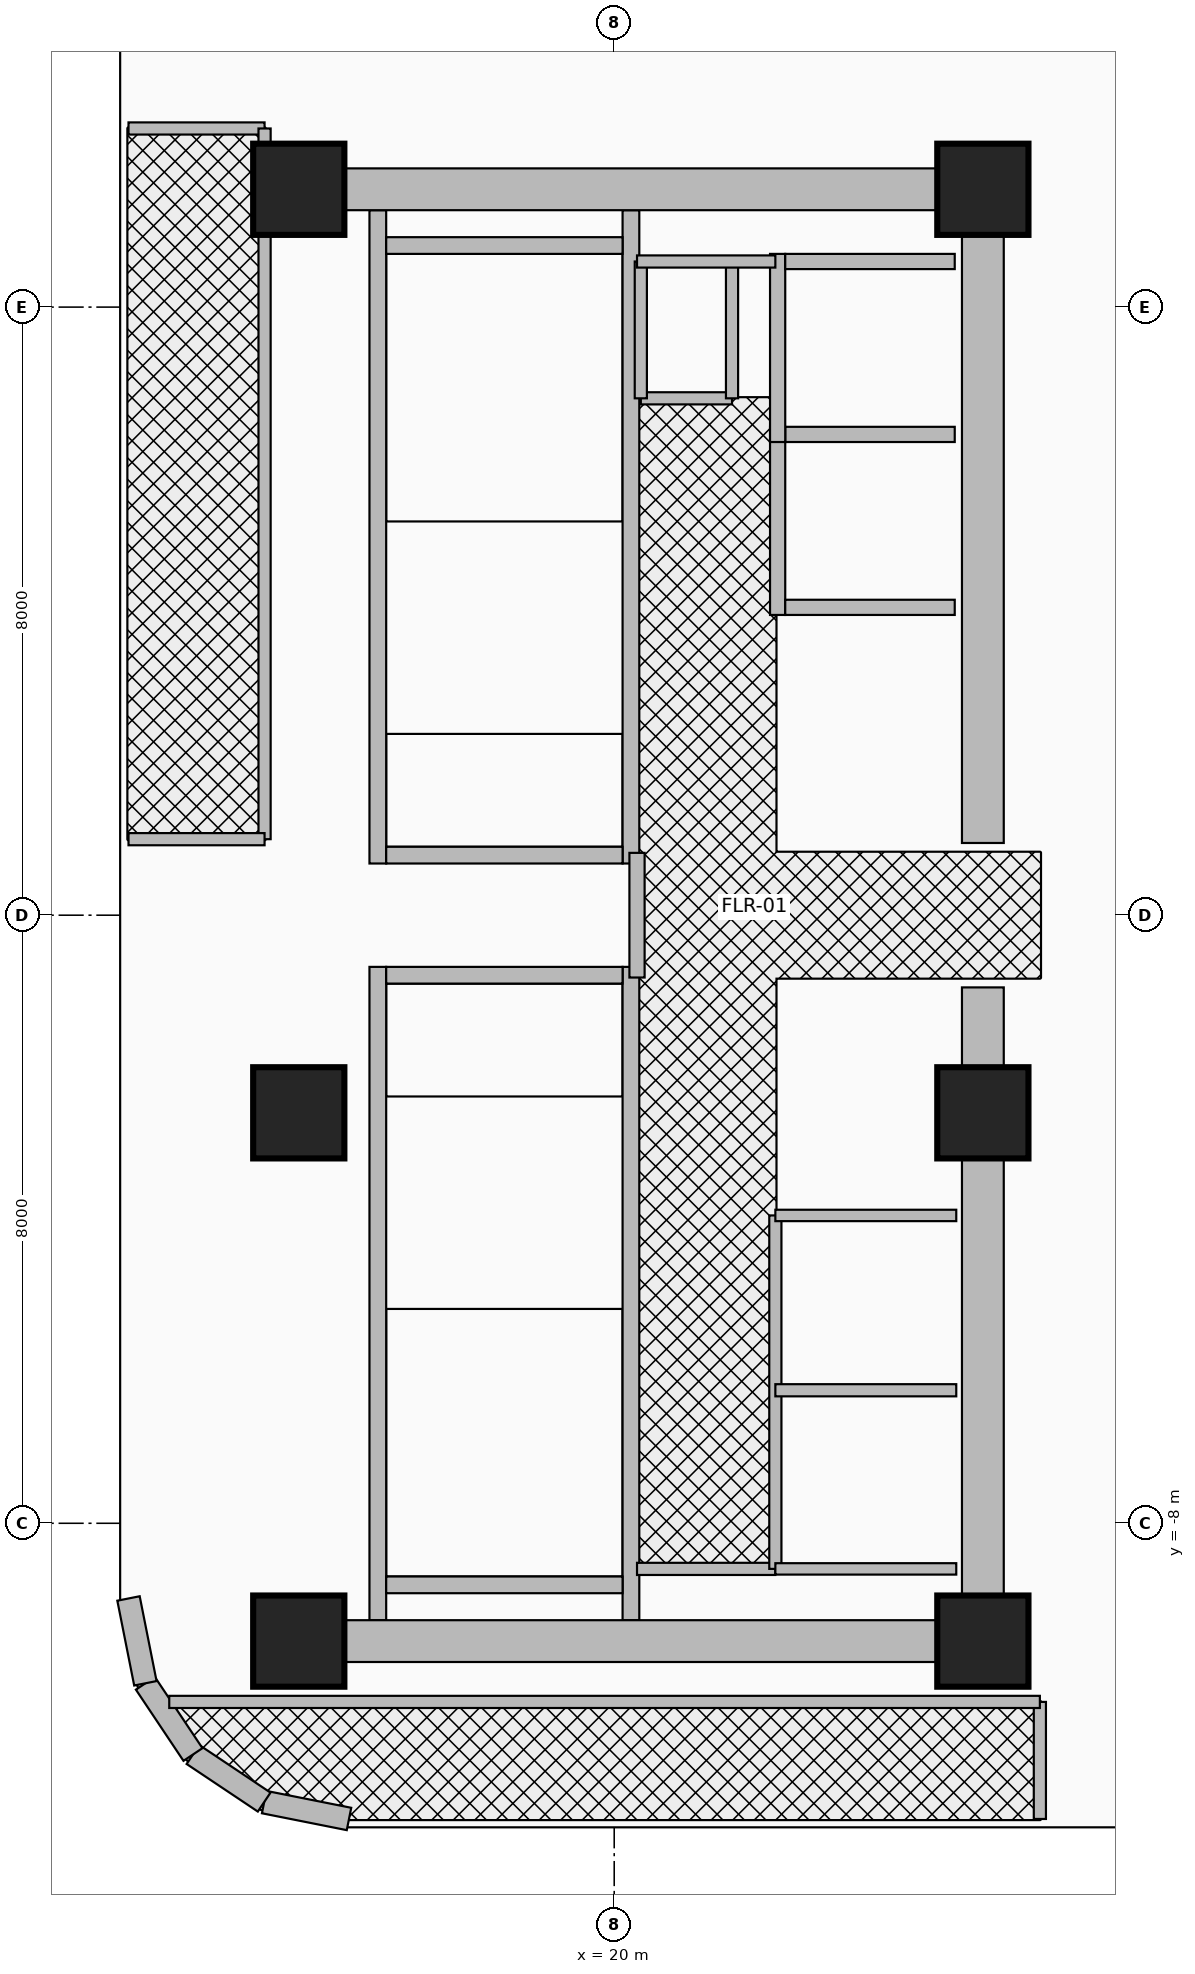
"""IFC4 building model, lengths in metres.
Left out: names, types, materials, properties, quantities, classifications, styles, units other than length and angle.
Written with IfcOpenShell. Run it as: python <this file> out.ifc"""

import sys

from ifc_helpers import new_model, si_unit, direction, frame, frame_2d, origin, origin_2d, place, context, subcontext, project, spatial, rectangle, extrude, source, transform, mapped, element, fill, save


model = new_model("IFC4")
c1 = context("Model", 3, precision=1e-05, world=origin(), true_north=direction((0.0, 1.0)))
c2 = subcontext(c1, "Body", "Model", "MODEL_VIEW")
j1 = project(units=[si_unit("LENGTHUNIT", "METRE"), si_unit("PLANEANGLEUNIT", "RADIAN")], contexts=[c1])
p1 = place(None, origin())
s1 = spatial("IfcSite", under=j1, at=p1, CompositionType="ELEMENT")
p2 = place(p1, origin())
s2 = spatial("IfcBuilding", under=s1, at=p2, CompositionType="ELEMENT")
p3 = place(p2, frame((0.0, 0.0, 153.8)))
s3 = spatial("IfcBuildingStorey", under=s2, at=p3, CompositionType="ELEMENT", Elevation=153.8)
for number, where, z_axis, x_axis in (
    (1, (16.89, 0.68, 0.0), (0.0, 0.0, 1.0), (0.0, 1.0, 0.0)),
    (2, (20.22, 0.68, 0.0), (0.0, 0.0, 1.0), (0.0, 1.0, 0.0)),
):
    element("IfcWall", number, at=place(p3, frame(where, z_axis=z_axis, x_axis=x_axis)), inside=s3, PredefinedType="SHEAR", context=c2, shape_type="SweptSolid", body=[
        extrude(rectangle(XDim=8.595, YDim=0.22, at=frame_2d((4.297, 0.0))), origin(), (0.0, 0.0, 1.0), 3.46),
    ])
p4 = place(p3, frame((17.0, 0.79, 0.0), z_axis=(0.0, 0.0, 1.0), x_axis=(1.0, 0.0, 0.0)))
e3 = element("IfcWall", 3, at=p4, inside=s3, PredefinedType="SHEAR", context=c2, shape_type="SweptSolid", body=[
    extrude(rectangle(XDim=3.11, YDim=0.22, at=frame_2d((1.555, 0.0))), origin(), (0.0, 0.0, 1.0), 3.46),
])
p5 = place(p4, frame((0.95, 0.0, 0.0)))
e4 = element("IfcOpeningElement", 4, at=p5, cuts=e3, PredefinedType="OPENING", context=c2, shape_type="SweptSolid", body=[
    extrude(rectangle(XDim=1.1, YDim=2.15, at=frame_2d((0.55, 1.075))), frame((0.0, 0.125, 0.0), z_axis=(0.0, -1.0, 0.0), x_axis=(1.0, 0.0, 0.0)), (0.0, 0.0, 1.0), 0.25),
])
p6 = place(p3, frame((17.0, 8.81, 0.0), z_axis=(0.0, 0.0, 1.0), x_axis=(1.0, 0.0, 0.0)))
e5 = element("IfcWall", 5, at=p6, inside=s3, PredefinedType="SHEAR", context=c2, shape_type="SweptSolid", body=[
    extrude(rectangle(XDim=3.11, YDim=0.22, at=frame_2d((1.555, 0.0))), origin(), (0.0, 0.0, 1.0), 3.46),
])
for number, where, z_axis, x_axis in (
    (6, (16.89, -9.275, 0.0), (0.0, 0.0, 1.0), (0.0, 1.0, 0.0)),
    (7, (20.22, -9.275, 0.0), (0.0, 0.0, 1.0), (0.0, 1.0, 0.0)),
):
    element("IfcWall", number, at=place(p3, frame(where, z_axis=z_axis, x_axis=x_axis)), inside=s3, PredefinedType="SHEAR", context=c2, shape_type="SweptSolid", body=[
        extrude(rectangle(XDim=8.595, YDim=0.22, at=frame_2d((4.297, 0.0))), origin(), (0.0, 0.0, 1.0), 3.46),
    ])
p7 = place(p3, frame((17.0, -8.81, 0.0), z_axis=(0.0, 0.0, 1.0), x_axis=(1.0, 0.0, 0.0)))
e8 = element("IfcWall", 8, at=p7, inside=s3, PredefinedType="SHEAR", context=c2, shape_type="SweptSolid", body=[
    extrude(rectangle(XDim=3.11, YDim=0.22, at=frame_2d((1.555, 0.0))), origin(), (0.0, 0.0, 1.0), 3.46),
])
p8 = place(p3, frame((17.0, -0.79, 0.0), z_axis=(0.0, 0.0, 1.0), x_axis=(1.0, 0.0, 0.0)))
e9 = element("IfcWall", 9, at=p8, inside=s3, PredefinedType="SHEAR", context=c2, shape_type="SweptSolid", body=[
    extrude(rectangle(XDim=3.11, YDim=0.22, at=frame_2d((1.555, 0.0))), origin(), (0.0, 0.0, 1.0), 3.46),
])
p9 = place(p8, frame((0.95, 0.0, 0.0)))
e10 = element("IfcOpeningElement", 10, at=p9, cuts=e9, PredefinedType="OPENING", context=c2, shape_type="SweptSolid", body=[
    extrude(rectangle(XDim=1.1, YDim=2.15, at=frame_2d((0.55, 1.075))), frame((0.0, 0.125, 0.0), z_axis=(0.0, -1.0, 0.0), x_axis=(1.0, 0.0, 0.0)), (0.0, 0.0, 1.0), 0.25),
])
for number, where, z_axis, x_axis in (
    (11, (24.85, -9.825, 0.0), (0.0, 0.0, 1.0), (0.0, 1.0, 0.0)),
    (12, (24.85, 0.95, 0.0), (0.0, 0.0, 1.0), (0.0, 1.0, 0.0)),
):
    element("IfcWall", number, at=place(p3, frame(where, z_axis=z_axis, x_axis=x_axis)), inside=s3, PredefinedType="SHEAR", context=c2, shape_type="SweptSolid", body=[
        extrude(rectangle(XDim=8.875, YDim=0.55, at=frame_2d((4.438, 0.0))), origin(), (0.0, 0.0, 1.0), 3.46),
    ])
for number, where, z_axis, x_axis in (
    (13, (15.85, 9.55, 0.0), (0.0, 0.0, 1.0), (1.0, 0.0, 0.0)),
    (14, (15.85, -9.55, 0.0), (0.0, 0.0, 1.0), (1.0, 0.0, 0.0)),
):
    element("IfcWall", number, at=place(p3, frame(where, z_axis=z_axis, x_axis=x_axis)), inside=s3, PredefinedType="SHEAR", context=c2, shape_type="SweptSolid", body=[
        extrude(rectangle(XDim=9.0, YDim=0.55, at=frame_2d((4.5, 0.0))), origin(), (0.0, 0.0, 1.0), 3.46),
    ])
m1 = source(origin(), c2, "Body", "SweptSolid", [
    extrude(rectangle(XDim=1.2, YDim=1.2, at=origin_2d()), origin(), (0.0, 0.0, 1.0), 3.7),
])
for number, where, z_axis, x_axis in (
    (15, (15.85, -9.55, 0.0), (0.0, 0.0, 1.0), (1.0, 0.0, 0.0)),
    (16, (24.85, -9.55, 0.0), (0.0, 0.0, 1.0), (1.0, 0.0, 0.0)),
    (17, (15.85, -2.6, 0.0), (0.0, 0.0, 1.0), (1.0, 0.0, 0.0)),
    (18, (24.85, -2.6, 0.0), (0.0, 0.0, 1.0), (1.0, 0.0, 0.0)),
    (19, (15.85, 9.55, 0.0), (0.0, 0.0, 1.0), (1.0, 0.0, 0.0)),
    (20, (24.85, 9.55, 0.0), (0.0, 0.0, 1.0), (1.0, 0.0, 0.0)),
):
    element("IfcColumn", number, at=place(p3, frame(where, z_axis=z_axis, x_axis=x_axis)), inside=s3, PredefinedType="COLUMN", context=c2, shape_type="MappedRepresentation", body=[
        mapped(m1, transform((0.0, 0.0, 0.0), x_axis=(1.0, 0.0, 0.0), y_axis=(0.0, 1.0, 0.0), z_axis=(0.0, 0.0, 1.0), scale=1.0)),
    ])
p10 = place(p3, frame((16.511, -11.89, 0.0), z_axis=(0.0, 0.0, 1.0), x_axis=(-0.980794657743, 0.195043173023, 0.0)))
e21 = element("IfcWall", 21, at=p10, inside=s3, PredefinedType="SOLIDWALL", context=c2, shape_type="SweptSolid", body=[
    extrude(rectangle(XDim=1.138, YDim=0.3, at=frame_2d((0.569, 0.0))), origin(), (0.0, 0.0, 1.0), 3.46),
])
for number, where, z_axis, x_axis in (
    (22, (15.395, -11.668, 0.0), (0.0, 0.0, 1.0), (-0.831, 0.556, 0.0)),
    (23, (14.458, -11.042, 0.0), (0.0, 0.0, 1.0), (-0.556, 0.831, 0.0)),
):
    element("IfcWall", number, at=place(p3, frame(where, z_axis=z_axis, x_axis=x_axis)), inside=s3, PredefinedType="SOLIDWALL", context=c2, shape_type="SweptSolid", body=[
        extrude(rectangle(XDim=1.127, YDim=0.3, at=frame_2d((0.563, 0.0))), origin(), (0.0, 0.0, 1.0), 3.46),
    ])
p11 = place(p3, frame((13.832, -10.105, 0.0), z_axis=(0.0, 0.0, 1.0), x_axis=(-0.195043173023, 0.980794657743, 0.0)))
e24 = element("IfcWall", 24, at=p11, inside=s3, PredefinedType="SOLIDWALL", context=c2, shape_type="SweptSolid", body=[
    extrude(rectangle(XDim=1.138, YDim=0.3, at=frame_2d((0.569, 0.0))), origin(), (0.0, 0.0, 1.0), 3.46),
])
p12 = place(p3, frame((22.15, 3.95, 0.0), z_axis=(0.0, 0.0, 1.0), x_axis=(0.0, 1.0, 0.0)))
e25 = element("IfcWall", 25, at=p12, inside=s3, PredefinedType="MOVABLE", context=c2, shape_type="SweptSolid", body=[
    extrude(rectangle(XDim=2.475, YDim=0.2, at=frame_2d((1.238, 0.0))), origin(), (0.0, 0.0, 1.0), 3.46),
])
p13 = place(p12, frame((0.688, 0.0, 0.0)))
e26 = element("IfcOpeningElement", 26, at=p13, cuts=e25, PredefinedType="OPENING", context=c2, shape_type="SweptSolid", body=[
    extrude(rectangle(XDim=1.1, YDim=2.1, at=frame_2d((0.55, 1.05))), frame((0.0, 0.115, 0.0), z_axis=(0.0, -1.0, 0.0), x_axis=(1.0, 0.0, 0.0)), (0.0, 0.0, 1.0), 0.23),
])
for number, where, z_axis, x_axis in (
    (27, (22.25, 4.05, 0.0), (0.0, 0.0, 1.0), (1.0, 0.0, 0.0)),
    (28, (22.25, 6.325, 0.0), (0.0, 0.0, 1.0), (1.0, 0.0, 0.0)),
):
    element("IfcWall", number, at=place(p3, frame(where, z_axis=z_axis, x_axis=x_axis)), inside=s3, PredefinedType="MOVABLE", context=c2, shape_type="SweptSolid", body=[
        extrude(rectangle(XDim=2.23, YDim=0.2, at=frame_2d((1.115, 0.0))), origin(), (0.0, 0.0, 1.0), 3.46),
    ])
p14 = place(p3, frame((22.15, 6.225, 0.0), z_axis=(0.0, 0.0, 1.0), x_axis=(0.0, 1.0, 0.0)))
e29 = element("IfcWall", 29, at=p14, inside=s3, PredefinedType="MOVABLE", context=c2, shape_type="SweptSolid", body=[
    extrude(rectangle(XDim=2.475, YDim=0.2, at=frame_2d((1.237, 0.0))), origin(), (0.0, 0.0, 1.0), 3.46),
])
p15 = place(p14, frame((0.688, 0.0, 0.0)))
e30 = element("IfcOpeningElement", 30, at=p15, cuts=e29, PredefinedType="OPENING", context=c2, shape_type="SweptSolid", body=[
    extrude(rectangle(XDim=1.1, YDim=2.1, at=frame_2d((0.55, 1.05))), frame((0.0, 0.115, 0.0), z_axis=(0.0, -1.0, 0.0), x_axis=(1.0, 0.0, 0.0)), (0.0, 0.0, 1.0), 0.23),
])
p16 = place(p3, frame((22.25, 8.6, 0.0), z_axis=(0.0, 0.0, 1.0), x_axis=(1.0, 0.0, 0.0)))
e31 = element("IfcWall", 31, at=p16, inside=s3, PredefinedType="MOVABLE", context=c2, shape_type="SweptSolid", body=[
    extrude(rectangle(XDim=2.23, YDim=0.2, at=frame_2d((1.115, 0.0))), origin(), (0.0, 0.0, 1.0), 3.46),
])
p17 = place(p3, frame((20.3, -0.82, 0.0), z_axis=(0.0, 0.0, 1.0), x_axis=(0.0, 1.0, 0.0)))
e32 = element("IfcWall", 32, at=p17, inside=s3, PredefinedType="PARTITIONING", context=c2, shape_type="SweptSolid", body=[
    extrude(rectangle(XDim=1.64, YDim=0.2, at=frame_2d((0.82, 0.0))), origin(), (0.0, 0.0, 1.0), 3.46),
])
p18 = place(p17, frame((0.295, 0.0, 0.0)))
e33 = element("IfcOpeningElement", 33, at=p18, cuts=e32, PredefinedType="OPENING", context=c2, shape_type="SweptSolid", body=[
    extrude(rectangle(XDim=1.05, YDim=2.15, at=frame_2d((0.525, 1.075))), frame((0.0, 0.115, 0.0), z_axis=(0.0, -1.0, 0.0), x_axis=(1.0, 0.0, 0.0)), (0.0, 0.0, 1.0), 0.23),
])
p19 = place(p3, frame((20.35, 6.8, 0.0), z_axis=(0.0, 0.0, 1.0), x_axis=(1.0, 0.0, 0.0)))
e34 = element("IfcWall", 34, at=p19, inside=s3, PredefinedType="PARTITIONING", context=c2, shape_type="SweptSolid", body=[
    extrude(rectangle(XDim=1.2, YDim=0.16, at=frame_2d((0.6, 0.0))), origin(), (0.0, 0.0, 1.0), 3.46),
])
p20 = place(p19, frame((0.175, 0.0, 0.0)))
e35 = element("IfcOpeningElement", 35, at=p20, cuts=e34, PredefinedType="OPENING", context=c2, shape_type="SweptSolid", body=[
    extrude(rectangle(XDim=0.85, YDim=2.05, at=frame_2d((0.425, 1.025))), frame((0.0, 0.095, 0.0), z_axis=(0.0, -1.0, 0.0), x_axis=(1.0, 0.0, 0.0)), (0.0, 0.0, 1.0), 0.19),
])
for number, where, z_axis, x_axis in (
    (36, (21.55, 6.8, 0.0), (0.0, 0.0, 1.0), (0.0, 1.0, 0.0)),
    (37, (20.35, 6.8, 0.0), (0.0, 0.0, 1.0), (0.0, 1.0, 0.0)),
):
    element("IfcWall", number, at=place(p3, frame(where, z_axis=z_axis, x_axis=x_axis)), inside=s3, PredefinedType="PARTITIONING", context=c2, shape_type="SweptSolid", body=[
        extrude(rectangle(XDim=1.8, YDim=0.16, at=frame_2d((0.9, 0.0))), origin(), (0.0, 0.0, 1.0), 3.46),
    ])
for number, where, z_axis, x_axis in (
    (38, (20.3, -8.6, 0.0), (0.0, 0.0, 1.0), (1.0, 0.0, 0.0)),
    (39, (20.3, 8.6, 0.0), (0.0, 0.0, 1.0), (1.0, 0.0, 0.0)),
):
    element("IfcWall", number, at=place(p3, frame(where, z_axis=z_axis, x_axis=x_axis)), inside=s3, PredefinedType="PARTITIONING", context=c2, shape_type="SweptSolid", body=[
        extrude(rectangle(XDim=1.82, YDim=0.16, at=frame_2d((0.91, 0.0))), origin(), (0.0, 0.0, 1.0), 3.46),
    ])
p21 = place(p3, frame((22.12, -8.6, 0.0), z_axis=(0.0, 0.0, 1.0), x_axis=(0.0, 1.0, 0.0)))
e40 = element("IfcWall", 40, at=p21, inside=s3, PredefinedType="PARTITIONING", context=c2, shape_type="SweptSolid", body=[
    extrude(rectangle(XDim=4.65, YDim=0.16, at=frame_2d((2.325, 0.0))), origin(), (0.0, 0.0, 1.0), 3.46),
])
p22 = place(p21, frame((0.7, 0.0, 0.0)))
e41 = element("IfcOpeningElement", 41, at=p22, cuts=e40, PredefinedType="OPENING", context=c2, shape_type="SweptSolid", body=[
    extrude(rectangle(XDim=0.85, YDim=2.05, at=frame_2d((0.425, 1.025))), frame((0.0, 0.095, 0.0), z_axis=(0.0, -1.0, 0.0), x_axis=(1.0, 0.0, 0.0)), (0.0, 0.0, 1.0), 0.19),
])
p23 = place(p21, frame((3.0, 0.0, 0.0)))
e42 = element("IfcOpeningElement", 42, at=p23, cuts=e40, PredefinedType="OPENING", context=c2, shape_type="SweptSolid", body=[
    extrude(rectangle(XDim=0.85, YDim=2.05, at=frame_2d((0.425, 1.025))), frame((0.0, 0.095, 0.0), z_axis=(0.0, -1.0, 0.0), x_axis=(1.0, 0.0, 0.0)), (0.0, 0.0, 1.0), 0.19),
])
for number, where, z_axis, x_axis in (
    (43, (22.12, -3.95, 0.0), (0.0, 0.0, 1.0), (1.0, 0.0, 0.0)),
    (44, (22.12, -8.6, 0.0), (0.0, 0.0, 1.0), (1.0, 0.0, 0.0)),
):
    element("IfcWall", number, at=place(p3, frame(where, z_axis=z_axis, x_axis=x_axis)), inside=s3, PredefinedType="PARTITIONING", context=c2, shape_type="SweptSolid", body=[
        extrude(rectangle(XDim=2.38, YDim=0.15, at=frame_2d((1.19, 0.0))), origin(), (0.0, 0.0, 1.0), 3.46),
    ])
p24 = place(p3, frame((22.12, -6.25, 0.0), z_axis=(0.0, 0.0, 1.0), x_axis=(1.0, 0.0, 0.0)))
e45 = element("IfcWall", 45, at=p24, inside=s3, PredefinedType="PARTITIONING", context=c2, shape_type="SweptSolid", body=[
    extrude(rectangle(XDim=2.38, YDim=0.16, at=frame_2d((1.19, 0.0))), origin(), (0.0, 0.0, 1.0), 3.46),
])
p25 = place(p3, frame((25.6, -11.89, 0.0), z_axis=(0.0, 0.0, 1.0), x_axis=(0.0, 1.0, 0.0)))
e46 = element("IfcWall", 46, at=p25, inside=s3, PredefinedType="PARTITIONING", context=c2, shape_type="SweptSolid", body=[
    extrude(rectangle(XDim=1.54, YDim=0.16, at=frame_2d((0.77, 0.0))), origin(), (0.0, 0.0, 1.0), 3.46),
])
p26 = place(p25, frame((0.32, 0.0, 0.0)))
e47 = element("IfcOpeningElement", 47, at=p26, cuts=e46, PredefinedType="OPENING", context=c2, shape_type="SweptSolid", body=[
    extrude(rectangle(XDim=0.9, YDim=2.1, at=frame_2d((0.45, 1.05))), frame((0.0, 0.095, 0.0), z_axis=(0.0, -1.0, 0.0), x_axis=(1.0, 0.0, 0.0)), (0.0, 0.0, 1.0), 0.19),
])
p27 = place(p3, frame((14.146, -10.35, 0.0), z_axis=(0.0, 0.0, 1.0), x_axis=(1.0, 0.0, 0.0)))
e48 = element("IfcWall", 48, at=p27, inside=s3, PredefinedType="PARTITIONING", context=c2, shape_type="SweptSolid", body=[
    extrude(rectangle(XDim=11.454, YDim=0.16, at=frame_2d((5.727, 0.0))), origin(), (0.0, 0.0, 1.0), 3.46),
])
p28 = place(p3, frame((13.61, 10.35, 0.0), z_axis=(0.0, 0.0, 1.0), x_axis=(1.0, 0.0, 0.0)))
e49 = element("IfcWall", 49, at=p28, inside=s3, PredefinedType="PARTITIONING", context=c2, shape_type="SweptSolid", body=[
    extrude(rectangle(XDim=1.79, YDim=0.16, at=frame_2d((0.895, 0.0))), origin(), (0.0, 0.0, 1.0), 3.46),
])
p29 = place(p28, frame((0.45, 0.0, 0.0)))
e50 = element("IfcOpeningElement", 50, at=p29, cuts=e49, PredefinedType="OPENING", context=c2, shape_type="SweptSolid", body=[
    extrude(rectangle(XDim=0.9, YDim=2.1, at=frame_2d((0.45, 1.05))), frame((0.0, 0.095, 0.0), z_axis=(0.0, -1.0, 0.0), x_axis=(1.0, 0.0, 0.0)), (0.0, 0.0, 1.0), 0.19),
])
p30 = place(p3, frame((15.4, 1.0, 0.0), z_axis=(0.0, 0.0, 1.0), x_axis=(0.0, 1.0, 0.0)))
e51 = element("IfcWall", 51, at=p30, inside=s3, PredefinedType="PARTITIONING", context=c2, shape_type="SweptSolid", body=[
    extrude(rectangle(XDim=9.35, YDim=0.16, at=frame_2d((4.675, 0.0))), origin(), (0.0, 0.0, 1.0), 3.46),
])
p31 = place(p3, frame((13.61, 1.0, 0.0), z_axis=(0.0, 0.0, 1.0), x_axis=(1.0, 0.0, 0.0)))
e52 = element("IfcWall", 52, at=p31, inside=s3, PredefinedType="PARTITIONING", context=c2, shape_type="SweptSolid", body=[
    extrude(rectangle(XDim=1.79, YDim=0.16, at=frame_2d((0.895, 0.0))), origin(), (0.0, 0.0, 1.0), 3.46),
])
p32 = place(p13, origin())
e53 = element("IfcDoor", 53, at=p32, inside=s3, OperationType="DOUBLE_DOOR_SLIDING", PredefinedType="DOOR", context=c2, shape_type="SweptSolid", body=[
    extrude(rectangle(XDim=1.1, YDim=2.1, at=frame_2d((0.55, 1.05))), frame((0.0, 0.025, 0.0), z_axis=(0.0, -1.0, 0.0), x_axis=(1.0, 0.0, 0.0)), (0.0, 0.0, 1.0), 0.05),
])
fill(e26, e53)
p33 = place(p15, origin())
e54 = element("IfcDoor", 54, at=p33, inside=s3, OperationType="DOUBLE_DOOR_SLIDING", PredefinedType="DOOR", context=c2, shape_type="SweptSolid", body=[
    extrude(rectangle(XDim=1.1, YDim=2.1, at=frame_2d((0.55, 1.05))), frame((0.0, 0.025, 0.0), z_axis=(0.0, -1.0, 0.0), x_axis=(1.0, 0.0, 0.0)), (0.0, 0.0, 1.0), 0.05),
])
fill(e30, e54)
p34 = place(p18, origin())
e55 = element("IfcDoor", 55, at=p34, inside=s3, OperationType="SINGLE_SWING_RIGHT", PredefinedType="DOOR", context=c2, shape_type="SweptSolid", body=[
    extrude(rectangle(XDim=1.05, YDim=2.15, at=frame_2d((0.525, 1.075))), frame((0.0, 0.025, 0.0), z_axis=(0.0, -1.0, 0.0), x_axis=(1.0, 0.0, 0.0)), (0.0, 0.0, 1.0), 0.05),
])
fill(e33, e55)
p35 = place(p5, frame((1.1, 0.0, 0.0), z_axis=(0.0, 0.0, 1.0), x_axis=(-1.0, 0.0, 0.0)))
e56 = element("IfcDoor", 56, at=p35, inside=s3, OperationType="SINGLE_SWING_LEFT", PredefinedType="DOOR", context=c2, shape_type="SweptSolid", body=[
    extrude(rectangle(XDim=1.1, YDim=2.15, at=frame_2d((0.55, 1.075))), frame((0.0, 0.025, 0.0), z_axis=(0.0, -1.0, 0.0), x_axis=(1.0, 0.0, 0.0)), (0.0, 0.0, 1.0), 0.05),
])
fill(e4, e56)
p36 = place(p9, origin())
e57 = element("IfcDoor", 57, at=p36, inside=s3, OperationType="SINGLE_SWING_RIGHT", PredefinedType="DOOR", context=c2, shape_type="SweptSolid", body=[
    extrude(rectangle(XDim=1.1, YDim=2.15, at=frame_2d((0.55, 1.075))), frame((0.0, 0.025, 0.0), z_axis=(0.0, -1.0, 0.0), x_axis=(1.0, 0.0, 0.0)), (0.0, 0.0, 1.0), 0.05),
])
fill(e10, e57)
p37 = place(p20, origin())
e58 = element("IfcDoor", 58, at=p37, inside=s3, OperationType="SINGLE_SWING_LEFT", PredefinedType="DOOR", context=c2, shape_type="SweptSolid", body=[
    extrude(rectangle(XDim=0.85, YDim=2.05, at=frame_2d((0.425, 1.025))), frame((0.0, 0.025, 0.0), z_axis=(0.0, -1.0, 0.0), x_axis=(1.0, 0.0, 0.0)), (0.0, 0.0, 1.0), 0.05),
])
fill(e35, e58)
p38 = place(p22, origin())
e59 = element("IfcDoor", 59, at=p38, inside=s3, OperationType="SINGLE_SWING_RIGHT", PredefinedType="DOOR", context=c2, shape_type="SweptSolid", body=[
    extrude(rectangle(XDim=0.85, YDim=2.05, at=frame_2d((0.425, 1.025))), frame((0.0, 0.025, 0.0), z_axis=(0.0, -1.0, 0.0), x_axis=(1.0, 0.0, 0.0)), (0.0, 0.0, 1.0), 0.05),
])
fill(e41, e59)
p39 = place(p23, origin())
e60 = element("IfcDoor", 60, at=p39, inside=s3, OperationType="SINGLE_SWING_LEFT", PredefinedType="DOOR", context=c2, shape_type="SweptSolid", body=[
    extrude(rectangle(XDim=0.85, YDim=2.05, at=frame_2d((0.425, 1.025))), frame((0.0, 0.025, 0.0), z_axis=(0.0, -1.0, 0.0), x_axis=(1.0, 0.0, 0.0)), (0.0, 0.0, 1.0), 0.05),
])
fill(e42, e60)
p40 = place(p26, origin())
e61 = element("IfcDoor", 61, at=p40, inside=s3, OperationType="SINGLE_SWING_RIGHT", PredefinedType="DOOR", context=c2, shape_type="SweptSolid", body=[
    extrude(rectangle(XDim=0.9, YDim=2.1, at=frame_2d((0.45, 1.05))), frame((0.0, 0.025, 0.0), z_axis=(0.0, -1.0, 0.0), x_axis=(1.0, 0.0, 0.0)), (0.0, 0.0, 1.0), 0.05),
])
fill(e47, e61)
p41 = place(p29, origin())
e62 = element("IfcDoor", 62, at=p41, inside=s3, OperationType="SINGLE_SWING_RIGHT", PredefinedType="DOOR", context=c2, shape_type="SweptSolid", body=[
    extrude(rectangle(XDim=0.9, YDim=2.1, at=frame_2d((0.45, 1.05))), frame((0.0, 0.025, 0.0), z_axis=(0.0, -1.0, 0.0), x_axis=(1.0, 0.0, 0.0)), (0.0, 0.0, 1.0), 0.05),
])
fill(e50, e62)
save(model, sys.argv[1])
